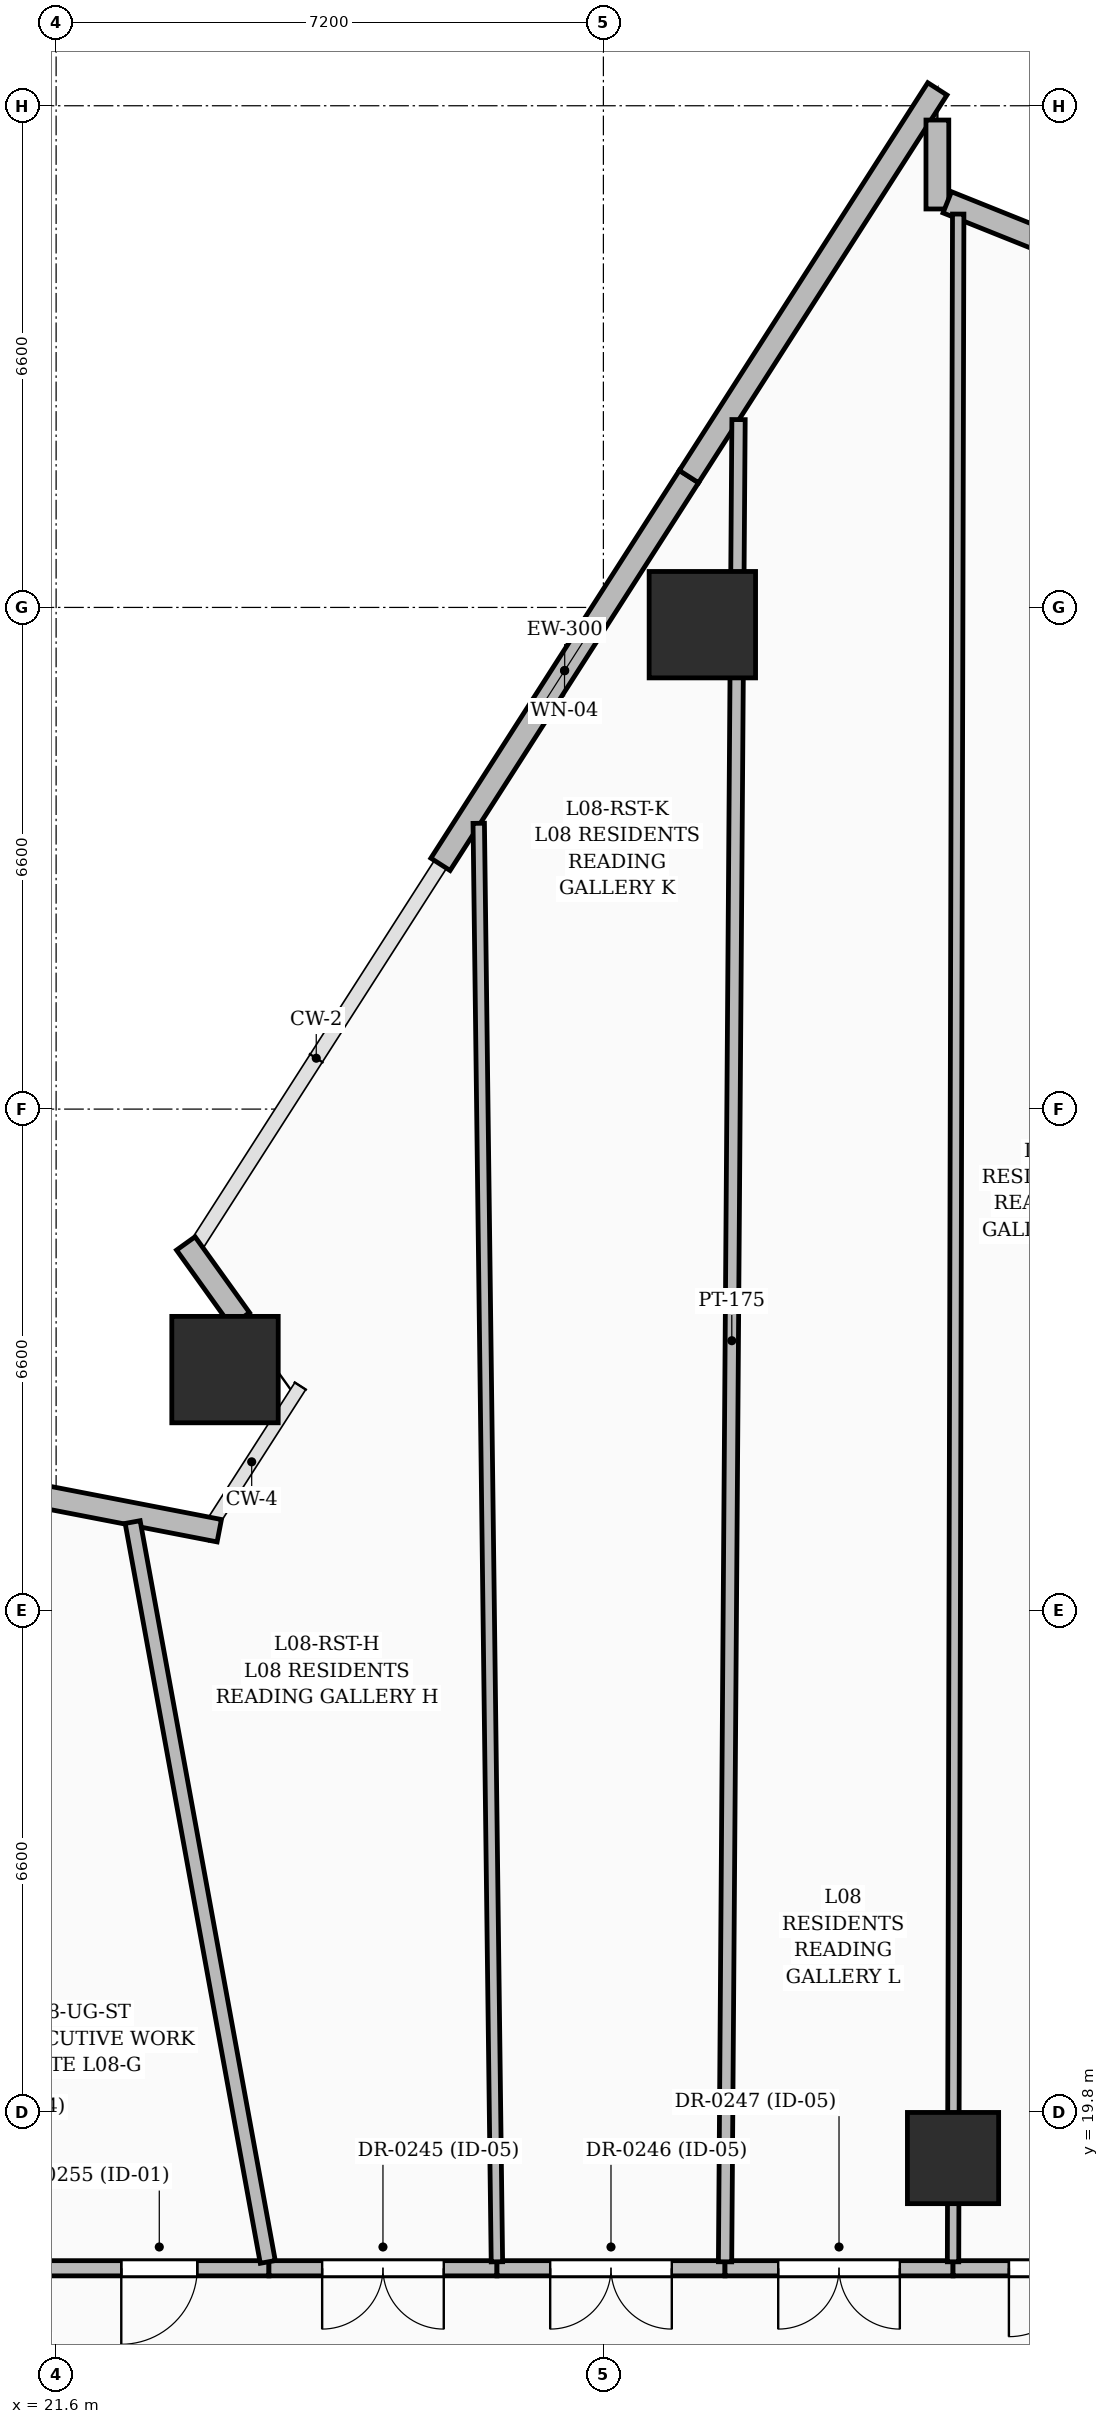
"""IFC4 building model, lengths in metres.
Left out: names, types, materials, properties, quantities, classifications, styles, units other than length and angle.
Written with IfcOpenShell. Run it as: python <this file> out.ifc"""

import sys

from ifc_helpers import new_model, si_unit, direction, frame, frame_2d, origin, origin_2d, place, context, subcontext, project, spatial, rectangle, extrude, element, fill, save


model = new_model("IFC4")
c1 = context("Model", 3, precision=1e-05, world=origin(), true_north=direction((0.0, 1.0)))
c2 = subcontext(c1, "Body", "Model", "MODEL_VIEW")
j1 = project(units=[si_unit("LENGTHUNIT", "METRE"), si_unit("PLANEANGLEUNIT", "RADIAN")], contexts=[c1])
p1 = place(None, origin())
s1 = spatial("IfcSite", under=j1, at=p1, CompositionType="ELEMENT")
p2 = place(p1, origin())
s2 = spatial("IfcBuilding", under=s1, at=p2, CompositionType="ELEMENT")
p3 = place(p2, frame((0.0, 0.0, 39.0)))
s3 = spatial("IfcBuildingStorey", under=s2, at=p3, CompositionType="ELEMENT", Elevation=39.0)
p4 = place(p3, frame((33.4, 19.2, 0.0), z_axis=(0.0, 0.0, 1.0), x_axis=(1.0, 0.0, 0.0)))
e1 = element("IfcColumn", 1, at=p4, inside=s3, PredefinedType="COLUMN", context=c2, shape_type="SweptSolid", body=[
    extrude(rectangle(XDim=1.2, YDim=1.2, at=origin_2d()), origin(), (0.0, 0.0, 1.0), 3.6),
])
for number, where, z_axis, x_axis in (
    (2, (30.102, 39.373, 0.0), (0.0, 0.0, 1.0), (1.0, 0.0, 0.0)),
    (3, (23.822, 29.573, 0.0), (0.0, 0.0, 1.0), (1.0, 0.0, 0.0)),
):
    element("IfcColumn", number, at=place(p3, frame(where, z_axis=z_axis, x_axis=x_axis)), inside=s3, PredefinedType="COLUMN", context=c2, shape_type="SweptSolid", body=[
        extrude(rectangle(XDim=1.4, YDim=1.4, at=origin_2d()), origin(), (0.0, 0.0, 1.0), 3.6),
    ])
p5 = place(p3, frame((21.201, 27.947, 0.0), z_axis=(0.0, 0.0, 1.0), x_axis=(0.981746971615, -0.190191702567, 0.0)))
e4 = element("IfcWall", 4, at=p5, inside=s3, PredefinedType="SOLIDWALL", context=c2, shape_type="SweptSolid", body=[
    extrude(rectangle(XDim=2.593, YDim=0.3, at=frame_2d((1.296, 0.0))), origin(), (0.0, 0.0, 1.0), 2.375),
])
p6 = place(p3, frame((24.022, 30.235, 0.0), z_axis=(0.0, 0.0, 1.0), x_axis=(-0.583004903736, 0.812468634607, 0.0)))
e5 = element("IfcWall", 5, at=p6, inside=s3, PredefinedType="SOLIDWALL", context=c2, shape_type="SweptSolid", body=[
    extrude(rectangle(XDim=1.228, YDim=0.3, at=frame_2d((0.614, 0.0))), origin(), (0.0, 0.0, 1.0), 2.375),
])
p7 = place(p3, frame((26.657, 36.22, 0.0), z_axis=(0.0, 0.0, 1.0), x_axis=(0.539506453767, 0.841981464371, 0.0)))
e6 = element("IfcWall", 6, at=p7, inside=s3, PredefinedType="SOLIDWALL", context=c2, shape_type="SweptSolid", body=[
    extrude(rectangle(XDim=6.058, YDim=0.3, at=frame_2d((3.029, 0.0))), origin(), (0.0, 0.0, 1.0), 3.35),
])
p8 = place(p7, frame((2.425, 0.0, 0.8)))
e7 = element("IfcOpeningElement", 7, at=p8, cuts=e6, PredefinedType="OPENING", context=c2, shape_type="SweptSolid", body=[
    extrude(rectangle(XDim=1.2, YDim=1.8, at=frame_2d((0.6, 0.9))), frame((0.0, 0.16, 0.0), z_axis=(0.0, -1.0, 0.0), x_axis=(1.0, 0.0, 0.0)), (0.0, 0.0, 1.0), 0.32),
])
p9 = place(p3, frame((29.925, 41.321, 0.0), z_axis=(0.0, 0.0, 1.0), x_axis=(0.53953502124, 0.841963158847, 0.0)))
e8 = element("IfcWall", 8, at=p9, inside=s3, PredefinedType="SOLIDWALL", context=c2, shape_type="SweptSolid", body=[
    extrude(rectangle(XDim=6.059, YDim=0.3, at=frame_2d((3.029, 0.0))), origin(), (0.0, 0.0, 1.0), 3.35),
])
p10 = place(p3, frame((33.194, 46.012, 0.0), z_axis=(0.0, 0.0, 1.0), x_axis=(0.0, -1.0, 0.0)))
e9 = element("IfcWall", 9, at=p10, inside=s3, PredefinedType="SOLIDWALL", context=c2, shape_type="SweptSolid", body=[
    extrude(rectangle(XDim=1.17, YDim=0.3, at=frame_2d((0.585, 0.0))), origin(), (0.0, 0.0, 1.0), 3.35),
])
p11 = place(p3, frame((33.324, 44.93, 0.0), z_axis=(0.0, 0.0, 1.0), x_axis=(0.928091921944, -0.372351157407, 0.0)))
e10 = element("IfcWall", 10, at=p11, inside=s3, PredefinedType="SOLIDWALL", context=c2, shape_type="SweptSolid", body=[
    extrude(rectangle(XDim=3.023, YDim=0.3, at=frame_2d((1.512, 0.0))), origin(), (0.0, 0.0, 1.0), 3.35),
])
p12 = place(p3, frame((24.4, 17.75, 0.0), z_axis=(0.0, 0.0, 1.0), x_axis=(-1.0, 0.0, 0.0)))
e11 = element("IfcWall", 11, at=p12, inside=s3, PredefinedType="PARTITIONING", context=c2, shape_type="SweptSolid", body=[
    extrude(rectangle(XDim=2.915, YDim=0.2, at=frame_2d((1.458, 0.0))), origin(), (0.0, 0.0, 1.0), 2.279),
])
p13 = place(p12, frame((0.943, 0.0, 0.0)))
e12 = element("IfcOpeningElement", 12, at=p13, cuts=e11, PredefinedType="OPENING", context=c2, shape_type="SweptSolid", body=[
    extrude(rectangle(XDim=1.0, YDim=2.2, at=frame_2d((0.5, 1.1))), frame((0.0, 0.11, 0.0), z_axis=(0.0, -1.0, 0.0), x_axis=(1.0, 0.0, 0.0)), (0.0, 0.0, 1.0), 0.22),
])
p14 = place(p3, frame((27.4, 17.75, 0.0), z_axis=(0.0, 0.0, 1.0), x_axis=(-1.0, 0.0, 0.0)))
e13 = element("IfcWall", 13, at=p14, inside=s3, PredefinedType="PARTITIONING", context=c2, shape_type="SweptSolid", body=[
    extrude(rectangle(XDim=3.0, YDim=0.2, at=frame_2d((1.5, 0.0))), origin(), (0.0, 0.0, 1.0), 2.771),
])
p15 = place(p14, frame((0.7, 0.0, 0.0)))
e14 = element("IfcOpeningElement", 14, at=p15, cuts=e13, PredefinedType="OPENING", context=c2, shape_type="SweptSolid", body=[
    extrude(rectangle(XDim=1.6, YDim=2.3, at=frame_2d((0.8, 1.15))), frame((0.0, 0.11, 0.0), z_axis=(0.0, -1.0, 0.0), x_axis=(1.0, 0.0, 0.0)), (0.0, 0.0, 1.0), 0.22),
])
p16 = place(p3, frame((30.4, 17.75, 0.0), z_axis=(0.0, 0.0, 1.0), x_axis=(-1.0, 0.0, 0.0)))
e15 = element("IfcWall", 15, at=p16, inside=s3, PredefinedType="PARTITIONING", context=c2, shape_type="SweptSolid", body=[
    extrude(rectangle(XDim=3.0, YDim=0.2, at=frame_2d((1.5, 0.0))), origin(), (0.0, 0.0, 1.0), 3.35),
])
p17 = place(p16, frame((0.7, 0.0, 0.0)))
e16 = element("IfcOpeningElement", 16, at=p17, cuts=e15, PredefinedType="OPENING", context=c2, shape_type="SweptSolid", body=[
    extrude(rectangle(XDim=1.6, YDim=2.3, at=frame_2d((0.8, 1.15))), frame((0.0, 0.11, 0.0), z_axis=(0.0, -1.0, 0.0), x_axis=(1.0, 0.0, 0.0)), (0.0, 0.0, 1.0), 0.22),
])
p18 = place(p3, frame((33.4, 17.75, 0.0), z_axis=(0.0, 0.0, 1.0), x_axis=(-1.0, 0.0, 0.0)))
e17 = element("IfcWall", 17, at=p18, inside=s3, PredefinedType="PARTITIONING", context=c2, shape_type="SweptSolid", body=[
    extrude(rectangle(XDim=3.0, YDim=0.2, at=frame_2d((1.5, 0.0))), origin(), (0.0, 0.0, 1.0), 3.35),
])
p19 = place(p18, frame((0.7, 0.0, 0.0)))
e18 = element("IfcOpeningElement", 18, at=p19, cuts=e17, PredefinedType="OPENING", context=c2, shape_type="SweptSolid", body=[
    extrude(rectangle(XDim=1.6, YDim=2.3, at=frame_2d((0.8, 1.15))), frame((0.0, 0.11, 0.0), z_axis=(0.0, -1.0, 0.0), x_axis=(1.0, 0.0, 0.0)), (0.0, 0.0, 1.0), 0.22),
])
p20 = place(p3, frame((35.77, 17.75, 0.0), z_axis=(0.0, 0.0, 1.0), x_axis=(-1.0, 0.0, 0.0)))
e19 = element("IfcWall", 19, at=p20, inside=s3, PredefinedType="PARTITIONING", context=c2, shape_type="SweptSolid", body=[
    extrude(rectangle(XDim=2.37, YDim=0.2, at=frame_2d((1.185, 0.0))), origin(), (0.0, 0.0, 1.0), 2.309),
])
p21 = place(p20, frame((0.735, 0.0, 0.0)))
e20 = element("IfcOpeningElement", 20, at=p21, cuts=e19, PredefinedType="OPENING", context=c2, shape_type="SweptSolid", body=[
    extrude(rectangle(XDim=0.9, YDim=2.1, at=frame_2d((0.45, 1.05))), frame((0.0, 0.11, 0.0), z_axis=(0.0, -1.0, 0.0), x_axis=(1.0, 0.0, 0.0)), (0.0, 0.0, 1.0), 0.22),
])
p22 = place(p3, frame((24.385, 17.833, 0.0), z_axis=(0.0, 0.0, 1.0), x_axis=(-0.179680097859, 0.98372509495, 0.0)))
e21 = element("IfcWall", 21, at=p22, inside=s3, PredefinedType="PARTITIONING", context=c2, shape_type="SweptSolid", body=[
    extrude(rectangle(XDim=9.895, YDim=0.2, at=frame_2d((4.947, 0.0))), origin(), (0.0, 0.0, 1.0), 2.37),
])
p23 = place(p3, frame((27.399, 17.835, 0.0), z_axis=(0.0, 0.0, 1.0), x_axis=(-0.012641377926, 0.99992009459, 0.0)))
e22 = element("IfcWall", 22, at=p23, inside=s3, PredefinedType="PARTITIONING", context=c2, shape_type="SweptSolid", body=[
    extrude(rectangle(XDim=18.927, YDim=0.15, at=frame_2d((9.463, 0.0))), origin(), (0.0, 0.0, 1.0), 2.279),
])
p24 = place(p3, frame((30.401, 17.835, 0.0), z_axis=(0.0, 0.0, 1.0), x_axis=(0.007313118493, 0.999973258791, 0.0)))
e23 = element("IfcWall", 23, at=p24, inside=s3, PredefinedType="PARTITIONING", context=c2, shape_type="SweptSolid", body=[
    extrude(rectangle(XDim=24.237, YDim=0.175, at=frame_2d((12.118, 0.0))), origin(), (0.0, 0.0, 1.0), 2.279),
])
p25 = place(p3, frame((33.4, 17.835, 0.0), z_axis=(0.0, 0.0, 1.0), x_axis=(0.002519340237, 0.999996826457, 0.0)))
e24 = element("IfcWall", 24, at=p25, inside=s3, PredefinedType="PARTITIONING", context=c2, shape_type="SweptSolid", body=[
    extrude(rectangle(XDim=26.94, YDim=0.15, at=frame_2d((13.47, 0.0))), origin(), (0.0, 0.0, 1.0), 2.279),
])
p26 = place(p8, origin())
e25 = element("IfcWindow", 25, at=p26, inside=s3, PartitioningType="SINGLE_PANEL", PredefinedType="WINDOW", context=c2, shape_type="SweptSolid", body=[
    extrude(rectangle(XDim=1.2, YDim=1.8, at=frame_2d((0.6, 0.9))), frame((0.0, 0.03, 0.0), z_axis=(0.0, -1.0, 0.0), x_axis=(1.0, 0.0, 0.0)), (0.0, 0.0, 1.0), 0.06),
])
fill(e7, e25)
p27 = place(p15, origin())
e26 = element("IfcDoor", 26, at=p27, inside=s3, OperationType="DOUBLE_DOOR_SINGLE_SWING", PredefinedType="DOOR", context=c2, shape_type="SweptSolid", body=[
    extrude(rectangle(XDim=1.6, YDim=2.3, at=frame_2d((0.8, 1.15))), frame((0.0, 0.025, 0.0), z_axis=(0.0, -1.0, 0.0), x_axis=(1.0, 0.0, 0.0)), (0.0, 0.0, 1.0), 0.05),
])
fill(e14, e26)
p28 = place(p17, origin())
e27 = element("IfcDoor", 27, at=p28, inside=s3, OperationType="DOUBLE_DOOR_SINGLE_SWING", PredefinedType="DOOR", context=c2, shape_type="SweptSolid", body=[
    extrude(rectangle(XDim=1.6, YDim=2.3, at=frame_2d((0.8, 1.15))), frame((0.0, 0.025, 0.0), z_axis=(0.0, -1.0, 0.0), x_axis=(1.0, 0.0, 0.0)), (0.0, 0.0, 1.0), 0.05),
])
fill(e16, e27)
p29 = place(p19, origin())
e28 = element("IfcDoor", 28, at=p29, inside=s3, OperationType="DOUBLE_DOOR_SINGLE_SWING", PredefinedType="DOOR", context=c2, shape_type="SweptSolid", body=[
    extrude(rectangle(XDim=1.6, YDim=2.3, at=frame_2d((0.8, 1.15))), frame((0.0, 0.025, 0.0), z_axis=(0.0, -1.0, 0.0), x_axis=(1.0, 0.0, 0.0)), (0.0, 0.0, 1.0), 0.05),
])
fill(e18, e28)
p30 = place(p21, origin())
e29 = element("IfcDoor", 29, at=p30, inside=s3, OperationType="SINGLE_SWING_RIGHT", PredefinedType="DOOR", context=c2, shape_type="SweptSolid", body=[
    extrude(rectangle(XDim=0.9, YDim=2.1, at=frame_2d((0.45, 1.05))), frame((0.0, 0.025, 0.0), z_axis=(0.0, -1.0, 0.0), x_axis=(1.0, 0.0, 0.0)), (0.0, 0.0, 1.0), 0.05),
])
fill(e20, e29)
p31 = place(p13, origin())
e30 = element("IfcDoor", 30, at=p31, inside=s3, OperationType="SINGLE_SWING_RIGHT", PredefinedType="DOOR", context=c2, shape_type="SweptSolid", body=[
    extrude(rectangle(XDim=1.0, YDim=2.2, at=frame_2d((0.5, 1.1))), frame((0.0, 0.025, 0.0), z_axis=(0.0, -1.0, 0.0), x_axis=(1.0, 0.0, 0.0)), (0.0, 0.0, 1.0), 0.05),
])
fill(e12, e30)
save(model, sys.argv[1])
